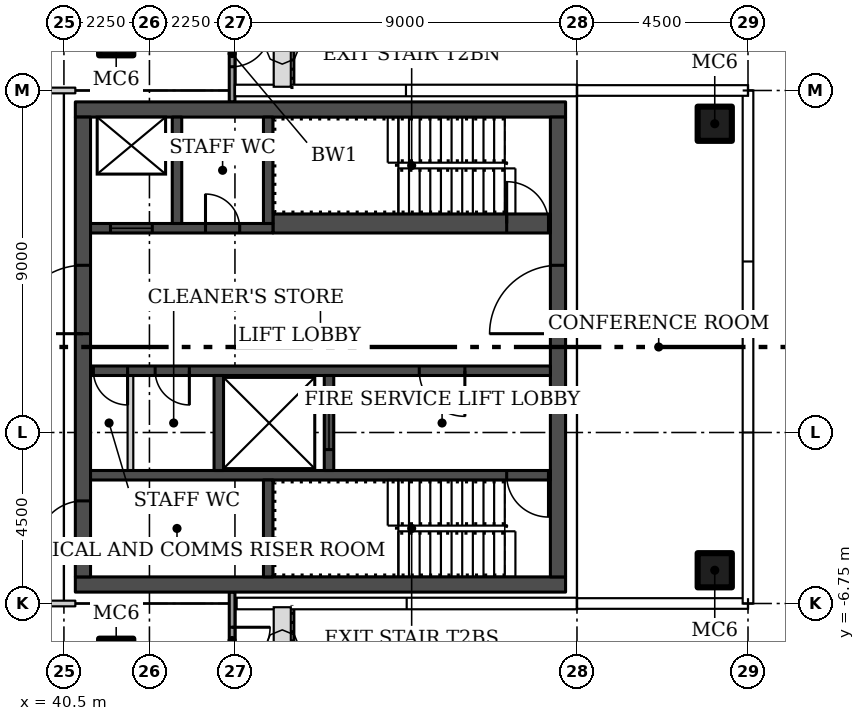
"""IFC4 building model, lengths in metres.
Left out: names, types, materials, properties, quantities, classifications, styles, units other than length and angle.
Written with IfcOpenShell. Run it as: python <this file> out.ifc"""

import sys

from ifc_helpers import new_model, si_unit, direction, frame, frame_2d, origin, origin_2d, place, context, subcontext, project, spatial, rectangle, hollow_rectangle, extrude, element, fill, save


model = new_model("IFC4")
c1 = context("Model", 3, precision=1e-05, world=origin(), true_north=direction((0.0, 1.0)))
c2 = subcontext(c1, "Body", "Model", "MODEL_VIEW")
j1 = project(units=[si_unit("LENGTHUNIT", "METRE"), si_unit("PLANEANGLEUNIT", "RADIAN")], contexts=[c1])
p1 = place(None, origin())
s1 = spatial("IfcSite", under=j1, at=p1, CompositionType="ELEMENT")
p2 = place(p1, origin())
s2 = spatial("IfcBuilding", under=s1, at=p2, CompositionType="ELEMENT")
p3 = place(p2, frame((0.0, 0.0, 257.7)))
s3 = spatial("IfcBuildingStorey", under=s2, at=p3, CompositionType="ELEMENT", Elevation=257.7)
for number, where in (
    (1, (41.875, 8.125, 0.0)),
    (2, (41.875, -8.125, 0.0)),
    (3, (57.625, -5.875, 0.0)),
    (4, (57.625, 5.875, 0.0)),
):
    element("IfcColumn", number, at=place(p3, frame(where)), inside=s3, PredefinedType="COLUMN", context=c2, shape_type="SweptSolid", body=[
        extrude(hollow_rectangle(XDim=0.9, YDim=0.9, WallThickness=0.036, at=origin_2d()), origin(), (0.0, 0.0, 1.0), 3.55),
    ])
p4 = place(p3, frame((26.7, 6.75, 0.0)))
e5 = element("IfcWall", 5, at=p4, inside=s3, PredefinedType="PARTITIONING", context=c2, shape_type="SweptSolid", body=[
    extrude(rectangle(XDim=14.1, YDim=0.15, at=frame_2d((7.05, 0.0))), origin(), (0.0, 0.0, 1.0), 3.55),
])
p5 = place(p4, frame((6.3, 0.0, 0.0)))
e6 = element("IfcOpeningElement", 6, at=p5, cuts=e5, PredefinedType="OPENING", context=c2, shape_type="SweptSolid", body=[
    extrude(rectangle(XDim=1.5, YDim=2.1, at=frame_2d((0.75, 1.05))), frame((0.0, 0.085, 0.0), z_axis=(0.0, -1.0, 0.0), x_axis=(1.0, 0.0, 0.0)), (0.0, 0.0, 1.0), 0.17),
])
p6 = place(p3, frame((40.8, -6.75, 0.0), z_axis=(0.0, 0.0, 1.0), x_axis=(-1.0, 0.0, 0.0)))
e7 = element("IfcWall", 7, at=p6, inside=s3, PredefinedType="PARTITIONING", context=c2, shape_type="SweptSolid", body=[
    extrude(rectangle(XDim=9.4, YDim=0.15, at=frame_2d((4.7, 0.0))), origin(), (0.0, 0.0, 1.0), 3.55),
])
p7 = place(p6, frame((4.3, 0.0, 0.0)))
e8 = element("IfcOpeningElement", 8, at=p7, cuts=e7, PredefinedType="OPENING", context=c2, shape_type="SweptSolid", body=[
    extrude(rectangle(XDim=1.0, YDim=2.4, at=frame_2d((0.5, 1.2))), frame((0.0, 0.085, 0.0), z_axis=(0.0, -1.0, 0.0), x_axis=(1.0, 0.0, 0.0)), (0.0, 0.0, 1.0), 0.17),
])
p8 = place(p3, frame((44.925, 9.0, 0.0), z_axis=(0.0, 0.0, 1.0), x_axis=(0.0, -1.0, 0.0)))
e9 = element("IfcWall", 9, at=p8, inside=s3, PredefinedType="SOLIDWALL", context=c2, shape_type="SweptSolid", body=[
    extrude(rectangle(XDim=2.557, YDim=0.15, at=frame_2d((1.278, 0.0))), origin(), (0.0, 0.0, 1.0), 3.45),
])
p9 = place(p8, frame((0.625, 0.0, 0.0)))
e10 = element("IfcOpeningElement", 10, at=p9, cuts=e9, PredefinedType="OPENING", context=c2, shape_type="SweptSolid", body=[
    extrude(rectangle(XDim=1.0, YDim=2.4, at=frame_2d((0.5, 1.2))), frame((0.0, 0.085, 0.0), z_axis=(0.0, -1.0, 0.0), x_axis=(1.0, 0.0, 0.0)), (0.0, 0.0, 1.0), 0.17),
])
p10 = place(p3, frame((44.925, -6.448, 0.0), z_axis=(0.0, 0.0, 1.0), x_axis=(0.0, -1.0, 0.0)))
e11 = element("IfcWall", 11, at=p10, inside=s3, PredefinedType="SOLIDWALL", context=c2, shape_type="SweptSolid", body=[
    extrude(rectangle(XDim=2.552, YDim=0.15, at=frame_2d((1.276, 0.0))), origin(), (0.0, 0.0, 1.0), 3.45),
])
p11 = place(p10, frame((0.927, 0.0, 0.0)))
e12 = element("IfcOpeningElement", 12, at=p11, cuts=e11, PredefinedType="OPENING", context=c2, shape_type="SweptSolid", body=[
    extrude(rectangle(XDim=1.0, YDim=2.4, at=frame_2d((0.5, 1.2))), frame((0.0, 0.085, 0.0), z_axis=(0.0, -1.0, 0.0), x_axis=(1.0, 0.0, 0.0)), (0.0, 0.0, 1.0), 0.17),
])
for number, where, z_axis, x_axis in (
    (13, (53.7, -6.25, 0.0), (0.0, 0.0, 1.0), (-1.0, 0.0, 0.0)),
    (14, (53.7, 6.25, 0.0), (0.0, 0.0, 1.0), (-1.0, 0.0, 0.0)),
):
    element("IfcWall", number, at=place(p3, frame(where, z_axis=z_axis, x_axis=x_axis)), inside=s3, PredefinedType="SHEAR", context=c2, shape_type="SweptSolid", body=[
        extrude(rectangle(XDim=12.9, YDim=0.4, at=frame_2d((6.45, 0.0))), origin(), (0.0, 0.0, 1.0), 3.55),
    ])
p12 = place(p3, frame((53.5, -6.05, 0.0), z_axis=(0.0, 0.0, 1.0), x_axis=(0.0, 1.0, 0.0)))
e15 = element("IfcWall", 15, at=p12, inside=s3, PredefinedType="SHEAR", context=c2, shape_type="SweptSolid", body=[
    extrude(rectangle(XDim=12.1, YDim=0.4, at=frame_2d((6.05, 0.0))), origin(), (0.0, 0.0, 1.0), 3.55),
])
p13 = place(p12, frame((6.4, 0.0, 0.0)))
e16 = element("IfcOpeningElement", 16, at=p13, cuts=e15, PredefinedType="OPENING", context=c2, shape_type="SweptSolid", body=[
    extrude(rectangle(XDim=1.8, YDim=2.4, at=frame_2d((0.9, 1.2))), frame((0.0, 0.21, 0.0), z_axis=(0.0, -1.0, 0.0), x_axis=(1.0, 0.0, 0.0)), (0.0, 0.0, 1.0), 0.42),
])
p14 = place(p3, frame((41.0, -6.05, 0.0), z_axis=(0.0, 0.0, 1.0), x_axis=(0.0, 1.0, 0.0)))
e17 = element("IfcWall", 17, at=p14, inside=s3, PredefinedType="SHEAR", context=c2, shape_type="SweptSolid", body=[
    extrude(rectangle(XDim=12.1, YDim=0.4, at=frame_2d((6.05, 0.0))), origin(), (0.0, 0.0, 1.0), 3.55),
])
p15 = place(p14, frame((0.8, 0.0, 0.0)))
e18 = element("IfcOpeningElement", 18, at=p15, cuts=e17, PredefinedType="OPENING", context=c2, shape_type="SweptSolid", body=[
    extrude(rectangle(XDim=1.2, YDim=2.1, at=frame_2d((0.6, 1.05))), frame((0.0, 0.21, 0.0), z_axis=(0.0, -1.0, 0.0), x_axis=(1.0, 0.0, 0.0)), (0.0, 0.0, 1.0), 0.42),
])
p16 = place(p14, frame((6.4, 0.0, 0.0)))
e19 = element("IfcOpeningElement", 19, at=p16, cuts=e17, PredefinedType="OPENING", context=c2, shape_type="SweptSolid", body=[
    extrude(rectangle(XDim=1.8, YDim=2.4, at=frame_2d((0.9, 1.2))), frame((0.0, 0.21, 0.0), z_axis=(0.0, -1.0, 0.0), x_axis=(1.0, 0.0, 0.0)), (0.0, 0.0, 1.0), 0.42),
])
p17 = place(p3, frame((53.3, -3.375, 0.0), z_axis=(0.0, 0.0, 1.0), x_axis=(-1.0, 0.0, 0.0)))
e20 = element("IfcWall", 20, at=p17, inside=s3, PredefinedType="SHEAR", context=c2, shape_type="SweptSolid", body=[
    extrude(rectangle(XDim=12.1, YDim=0.25, at=frame_2d((6.05, 0.0))), origin(), (0.0, 0.0, 1.0), 3.55),
])
p18 = place(p17, frame((0.05, 0.0, 0.0)))
e21 = element("IfcOpeningElement", 21, at=p18, cuts=e20, PredefinedType="OPENING", context=c2, shape_type="SweptSolid", body=[
    extrude(rectangle(XDim=1.1, YDim=2.1, at=frame_2d((0.55, 1.05))), frame((0.0, 0.135, 0.0), z_axis=(0.0, -1.0, 0.0), x_axis=(1.0, 0.0, 0.0)), (0.0, 0.0, 1.0), 0.27),
])
p19 = place(p3, frame((45.875, -6.05, 0.0), z_axis=(0.0, 0.0, 1.0), x_axis=(0.0, 1.0, 0.0)))
e22 = element("IfcWall", 22, at=p19, inside=s3, PredefinedType="SHEAR", context=c2, shape_type="SweptSolid", body=[
    extrude(rectangle(XDim=2.55, YDim=0.25, at=frame_2d((1.275, 0.0))), origin(), (0.0, 0.0, 1.0), 3.55),
])
p20 = place(p3, frame((53.3, -0.625, 0.0), z_axis=(0.0, 0.0, 1.0), x_axis=(-1.0, 0.0, 0.0)))
e23 = element("IfcWall", 23, at=p20, inside=s3, PredefinedType="SHEAR", context=c2, shape_type="SweptSolid", body=[
    extrude(rectangle(XDim=12.1, YDim=0.25, at=frame_2d((6.05, 0.0))), origin(), (0.0, 0.0, 1.0), 3.55),
])
p21 = place(p20, frame((2.25, 0.0, 0.0)))
e24 = element("IfcOpeningElement", 24, at=p21, cuts=e23, PredefinedType="OPENING", context=c2, shape_type="SweptSolid", body=[
    extrude(rectangle(XDim=1.2, YDim=2.1, at=frame_2d((0.6, 1.05))), frame((0.0, 0.135, 0.0), z_axis=(0.0, -1.0, 0.0), x_axis=(1.0, 0.0, 0.0)), (0.0, 0.0, 1.0), 0.27),
])
p22 = place(p20, frame((9.5, 0.0, 0.0)))
e25 = element("IfcOpeningElement", 25, at=p22, cuts=e23, PredefinedType="OPENING", context=c2, shape_type="SweptSolid", body=[
    extrude(rectangle(XDim=0.9, YDim=2.1, at=frame_2d((0.45, 1.05))), frame((0.0, 0.135, 0.0), z_axis=(0.0, -1.0, 0.0), x_axis=(1.0, 0.0, 0.0)), (0.0, 0.0, 1.0), 0.27),
])
p23 = place(p20, frame((11.125, 0.0, 0.0)))
e26 = element("IfcOpeningElement", 26, at=p23, cuts=e23, PredefinedType="OPENING", context=c2, shape_type="SweptSolid", body=[
    extrude(rectangle(XDim=0.9, YDim=2.1, at=frame_2d((0.45, 1.05))), frame((0.0, 0.135, 0.0), z_axis=(0.0, -1.0, 0.0), x_axis=(1.0, 0.0, 0.0)), (0.0, 0.0, 1.0), 0.27),
])
p24 = place(p3, frame((47.475, -3.25, 0.0), z_axis=(0.0, 0.0, 1.0), x_axis=(0.0, 1.0, 0.0)))
e27 = element("IfcWall", 27, at=p24, inside=s3, PredefinedType="SHEAR", context=c2, shape_type="SweptSolid", body=[
    extrude(rectangle(XDim=2.5, YDim=0.25, at=frame_2d((1.25, 0.0))), origin(), (0.0, 0.0, 1.0), 3.55),
])
p25 = place(p24, frame((0.55, 0.0, 0.0)))
e28 = element("IfcOpeningElement", 28, at=p25, cuts=e27, PredefinedType="OPENING", context=c2, shape_type="SweptSolid", body=[
    extrude(rectangle(XDim=1.4, YDim=2.4, at=frame_2d((0.7, 1.2))), frame((0.0, 0.135, 0.0), z_axis=(0.0, -1.0, 0.0), x_axis=(1.0, 0.0, 0.0)), (0.0, 0.0, 1.0), 0.27),
])
p26 = place(p3, frame((44.575, -3.25, 0.0), z_axis=(0.0, 0.0, 1.0), x_axis=(0.0, 1.0, 0.0)))
e29 = element("IfcWall", 29, at=p26, inside=s3, PredefinedType="SHEAR", context=c2, shape_type="SweptSolid", body=[
    extrude(rectangle(XDim=2.5, YDim=0.25, at=frame_2d((1.25, 0.0))), origin(), (0.0, 0.0, 1.0), 3.55),
])
p27 = place(p3, frame((42.25, -3.25, 0.0), z_axis=(0.0, 0.0, 1.0), x_axis=(0.0, 1.0, 0.0)))
e30 = element("IfcWall", 30, at=p27, inside=s3, PredefinedType="PARTITIONING", context=c2, shape_type="SweptSolid", body=[
    extrude(rectangle(XDim=2.5, YDim=0.15, at=frame_2d((1.25, 0.0))), origin(), (0.0, 0.0, 1.0), 3.55),
])
p28 = place(p3, frame((46.0, 3.25, 0.0)))
e31 = element("IfcWall", 31, at=p28, inside=s3, PredefinedType="SHEAR", context=c2, shape_type="SweptSolid", body=[
    extrude(rectangle(XDim=7.3, YDim=0.5, at=frame_2d((3.65, 0.0))), origin(), (0.0, 0.0, 1.0), 3.55),
])
p29 = place(p28, frame((6.15, 0.0, 0.0)))
e32 = element("IfcOpeningElement", 32, at=p29, cuts=e31, PredefinedType="OPENING", context=c2, shape_type="SweptSolid", body=[
    extrude(rectangle(XDim=1.1, YDim=2.1, at=frame_2d((0.55, 1.05))), frame((0.0, 0.26, 0.0), z_axis=(0.0, -1.0, 0.0), x_axis=(1.0, 0.0, 0.0)), (0.0, 0.0, 1.0), 0.52),
])
p30 = place(p3, frame((41.2, 3.125, 0.0)))
e33 = element("IfcWall", 33, at=p30, inside=s3, PredefinedType="SHEAR", context=c2, shape_type="SweptSolid", body=[
    extrude(rectangle(XDim=4.8, YDim=0.25, at=frame_2d((2.4, 0.0))), origin(), (0.0, 0.0, 1.0), 3.55),
])
p31 = place(p30, frame((0.525, 0.0, 0.0)))
e34 = element("IfcOpeningElement", 34, at=p31, cuts=e33, PredefinedType="OPENING", context=c2, shape_type="SweptSolid", body=[
    extrude(rectangle(XDim=1.1, YDim=2.1, at=frame_2d((0.55, 1.05))), frame((0.0, 0.135, 0.0), z_axis=(0.0, -1.0, 0.0), x_axis=(1.0, 0.0, 0.0)), (0.0, 0.0, 1.0), 0.27),
])
p32 = place(p30, frame((3.025, 0.0, 0.0)))
e35 = element("IfcOpeningElement", 35, at=p32, cuts=e33, PredefinedType="OPENING", context=c2, shape_type="SweptSolid", body=[
    extrude(rectangle(XDim=0.9, YDim=2.1, at=frame_2d((0.45, 1.05))), frame((0.0, 0.135, 0.0), z_axis=(0.0, -1.0, 0.0), x_axis=(1.0, 0.0, 0.0)), (0.0, 0.0, 1.0), 0.27),
])
for number, where, z_axis, x_axis in (
    (36, (45.875, 3.25, 0.0), (0.0, 0.0, 1.0), (0.0, 1.0, 0.0)),
    (37, (43.475, 3.25, 0.0), (0.0, 0.0, 1.0), (0.0, 1.0, 0.0)),
):
    element("IfcWall", number, at=place(p3, frame(where, z_axis=z_axis, x_axis=x_axis)), inside=s3, PredefinedType="SHEAR", context=c2, shape_type="SweptSolid", body=[
        extrude(rectangle(XDim=2.8, YDim=0.25, at=frame_2d((1.4, 0.0))), origin(), (0.0, 0.0, 1.0), 3.55),
    ])
p33 = place(p9, origin())
e38 = element("IfcDoor", 38, at=p33, inside=s3, OperationType="SINGLE_SWING_LEFT", PredefinedType="DOOR", context=c2, shape_type="SweptSolid", body=[
    extrude(rectangle(XDim=1.0, YDim=2.4, at=frame_2d((0.5, 1.2))), frame((0.0, 0.025, 0.0), z_axis=(0.0, -1.0, 0.0), x_axis=(1.0, 0.0, 0.0)), (0.0, 0.0, 1.0), 0.05),
])
fill(e10, e38)
p34 = place(p11, origin())
e39 = element("IfcDoor", 39, at=p34, inside=s3, OperationType="SINGLE_SWING_RIGHT", PredefinedType="DOOR", context=c2, shape_type="SweptSolid", body=[
    extrude(rectangle(XDim=1.0, YDim=2.4, at=frame_2d((0.5, 1.2))), frame((0.0, 0.025, 0.0), z_axis=(0.0, -1.0, 0.0), x_axis=(1.0, 0.0, 0.0)), (0.0, 0.0, 1.0), 0.05),
])
fill(e12, e39)
p35 = place(p13, origin())
e40 = element("IfcDoor", 40, at=p35, inside=s3, OperationType="DOUBLE_DOOR_SINGLE_SWING", PredefinedType="DOOR", context=c2, shape_type="SweptSolid", body=[
    extrude(rectangle(XDim=1.8, YDim=2.4, at=frame_2d((0.9, 1.2))), frame((0.0, 0.025, 0.0), z_axis=(0.0, -1.0, 0.0), x_axis=(1.0, 0.0, 0.0)), (0.0, 0.0, 1.0), 0.05),
])
fill(e16, e40)
p36 = place(p15, origin())
e41 = element("IfcDoor", 41, at=p36, inside=s3, OperationType="SINGLE_SWING_LEFT", PredefinedType="DOOR", context=c2, shape_type="SweptSolid", body=[
    extrude(rectangle(XDim=1.2, YDim=2.1, at=frame_2d((0.6, 1.05))), frame((0.0, 0.025, 0.0), z_axis=(0.0, -1.0, 0.0), x_axis=(1.0, 0.0, 0.0)), (0.0, 0.0, 1.0), 0.05),
])
fill(e18, e41)
p37 = place(p16, origin())
e42 = element("IfcDoor", 42, at=p37, inside=s3, OperationType="DOUBLE_DOOR_SINGLE_SWING", PredefinedType="DOOR", context=c2, shape_type="SweptSolid", body=[
    extrude(rectangle(XDim=1.8, YDim=2.4, at=frame_2d((0.9, 1.2))), frame((0.0, 0.025, 0.0), z_axis=(0.0, -1.0, 0.0), x_axis=(1.0, 0.0, 0.0)), (0.0, 0.0, 1.0), 0.05),
])
fill(e19, e42)
p38 = place(p18, origin())
e43 = element("IfcDoor", 43, at=p38, inside=s3, OperationType="SINGLE_SWING_LEFT", PredefinedType="DOOR", context=c2, shape_type="SweptSolid", body=[
    extrude(rectangle(XDim=1.1, YDim=2.1, at=frame_2d((0.55, 1.05))), frame((0.0, 0.025, 0.0), z_axis=(0.0, -1.0, 0.0), x_axis=(1.0, 0.0, 0.0)), (0.0, 0.0, 1.0), 0.05),
])
fill(e21, e43)
p39 = place(p21, origin())
e44 = element("IfcDoor", 44, at=p39, inside=s3, OperationType="SINGLE_SWING_LEFT", PredefinedType="DOOR", context=c2, shape_type="SweptSolid", body=[
    extrude(rectangle(XDim=1.2, YDim=2.1, at=frame_2d((0.6, 1.05))), frame((0.0, 0.025, 0.0), z_axis=(0.0, -1.0, 0.0), x_axis=(1.0, 0.0, 0.0)), (0.0, 0.0, 1.0), 0.05),
])
fill(e24, e44)
p40 = place(p22, origin())
e45 = element("IfcDoor", 45, at=p40, inside=s3, OperationType="SINGLE_SWING_RIGHT", PredefinedType="DOOR", context=c2, shape_type="SweptSolid", body=[
    extrude(rectangle(XDim=0.9, YDim=2.1, at=frame_2d((0.45, 1.05))), frame((0.0, 0.025, 0.0), z_axis=(0.0, -1.0, 0.0), x_axis=(1.0, 0.0, 0.0)), (0.0, 0.0, 1.0), 0.05),
])
fill(e25, e45)
p41 = place(p23, origin())
e46 = element("IfcDoor", 46, at=p41, inside=s3, OperationType="SINGLE_SWING_RIGHT", PredefinedType="DOOR", context=c2, shape_type="SweptSolid", body=[
    extrude(rectangle(XDim=0.9, YDim=2.1, at=frame_2d((0.45, 1.05))), frame((0.0, 0.025, 0.0), z_axis=(0.0, -1.0, 0.0), x_axis=(1.0, 0.0, 0.0)), (0.0, 0.0, 1.0), 0.05),
])
fill(e26, e46)
p42 = place(p25, origin())
e47 = element("IfcDoor", 47, at=p42, inside=s3, OperationType="SLIDING_TO_LEFT", PredefinedType="DOOR", context=c2, shape_type="SweptSolid", body=[
    extrude(rectangle(XDim=1.4, YDim=2.4, at=frame_2d((0.7, 1.2))), frame((0.0, 0.025, 0.0), z_axis=(0.0, -1.0, 0.0), x_axis=(1.0, 0.0, 0.0)), (0.0, 0.0, 1.0), 0.05),
])
fill(e28, e47)
p43 = place(p29, origin())
e48 = element("IfcDoor", 48, at=p43, inside=s3, OperationType="SINGLE_SWING_RIGHT", PredefinedType="DOOR", context=c2, shape_type="SweptSolid", body=[
    extrude(rectangle(XDim=1.1, YDim=2.1, at=frame_2d((0.55, 1.05))), frame((0.0, 0.025, 0.0), z_axis=(0.0, -1.0, 0.0), x_axis=(1.0, 0.0, 0.0)), (0.0, 0.0, 1.0), 0.05),
])
fill(e32, e48)
p44 = place(p31, origin())
e49 = element("IfcDoor", 49, at=p44, inside=s3, OperationType="SLIDING_TO_LEFT", PredefinedType="DOOR", context=c2, shape_type="SweptSolid", body=[
    extrude(rectangle(XDim=1.1, YDim=2.1, at=frame_2d((0.55, 1.05))), frame((0.0, 0.025, 0.0), z_axis=(0.0, -1.0, 0.0), x_axis=(1.0, 0.0, 0.0)), (0.0, 0.0, 1.0), 0.05),
])
fill(e34, e49)
p45 = place(p32, origin())
e50 = element("IfcDoor", 50, at=p45, inside=s3, OperationType="SINGLE_SWING_RIGHT", PredefinedType="DOOR", context=c2, shape_type="SweptSolid", body=[
    extrude(rectangle(XDim=0.9, YDim=2.1, at=frame_2d((0.45, 1.05))), frame((0.0, 0.025, 0.0), z_axis=(0.0, -1.0, 0.0), x_axis=(1.0, 0.0, 0.0)), (0.0, 0.0, 1.0), 0.05),
])
fill(e35, e50)
save(model, sys.argv[1])
